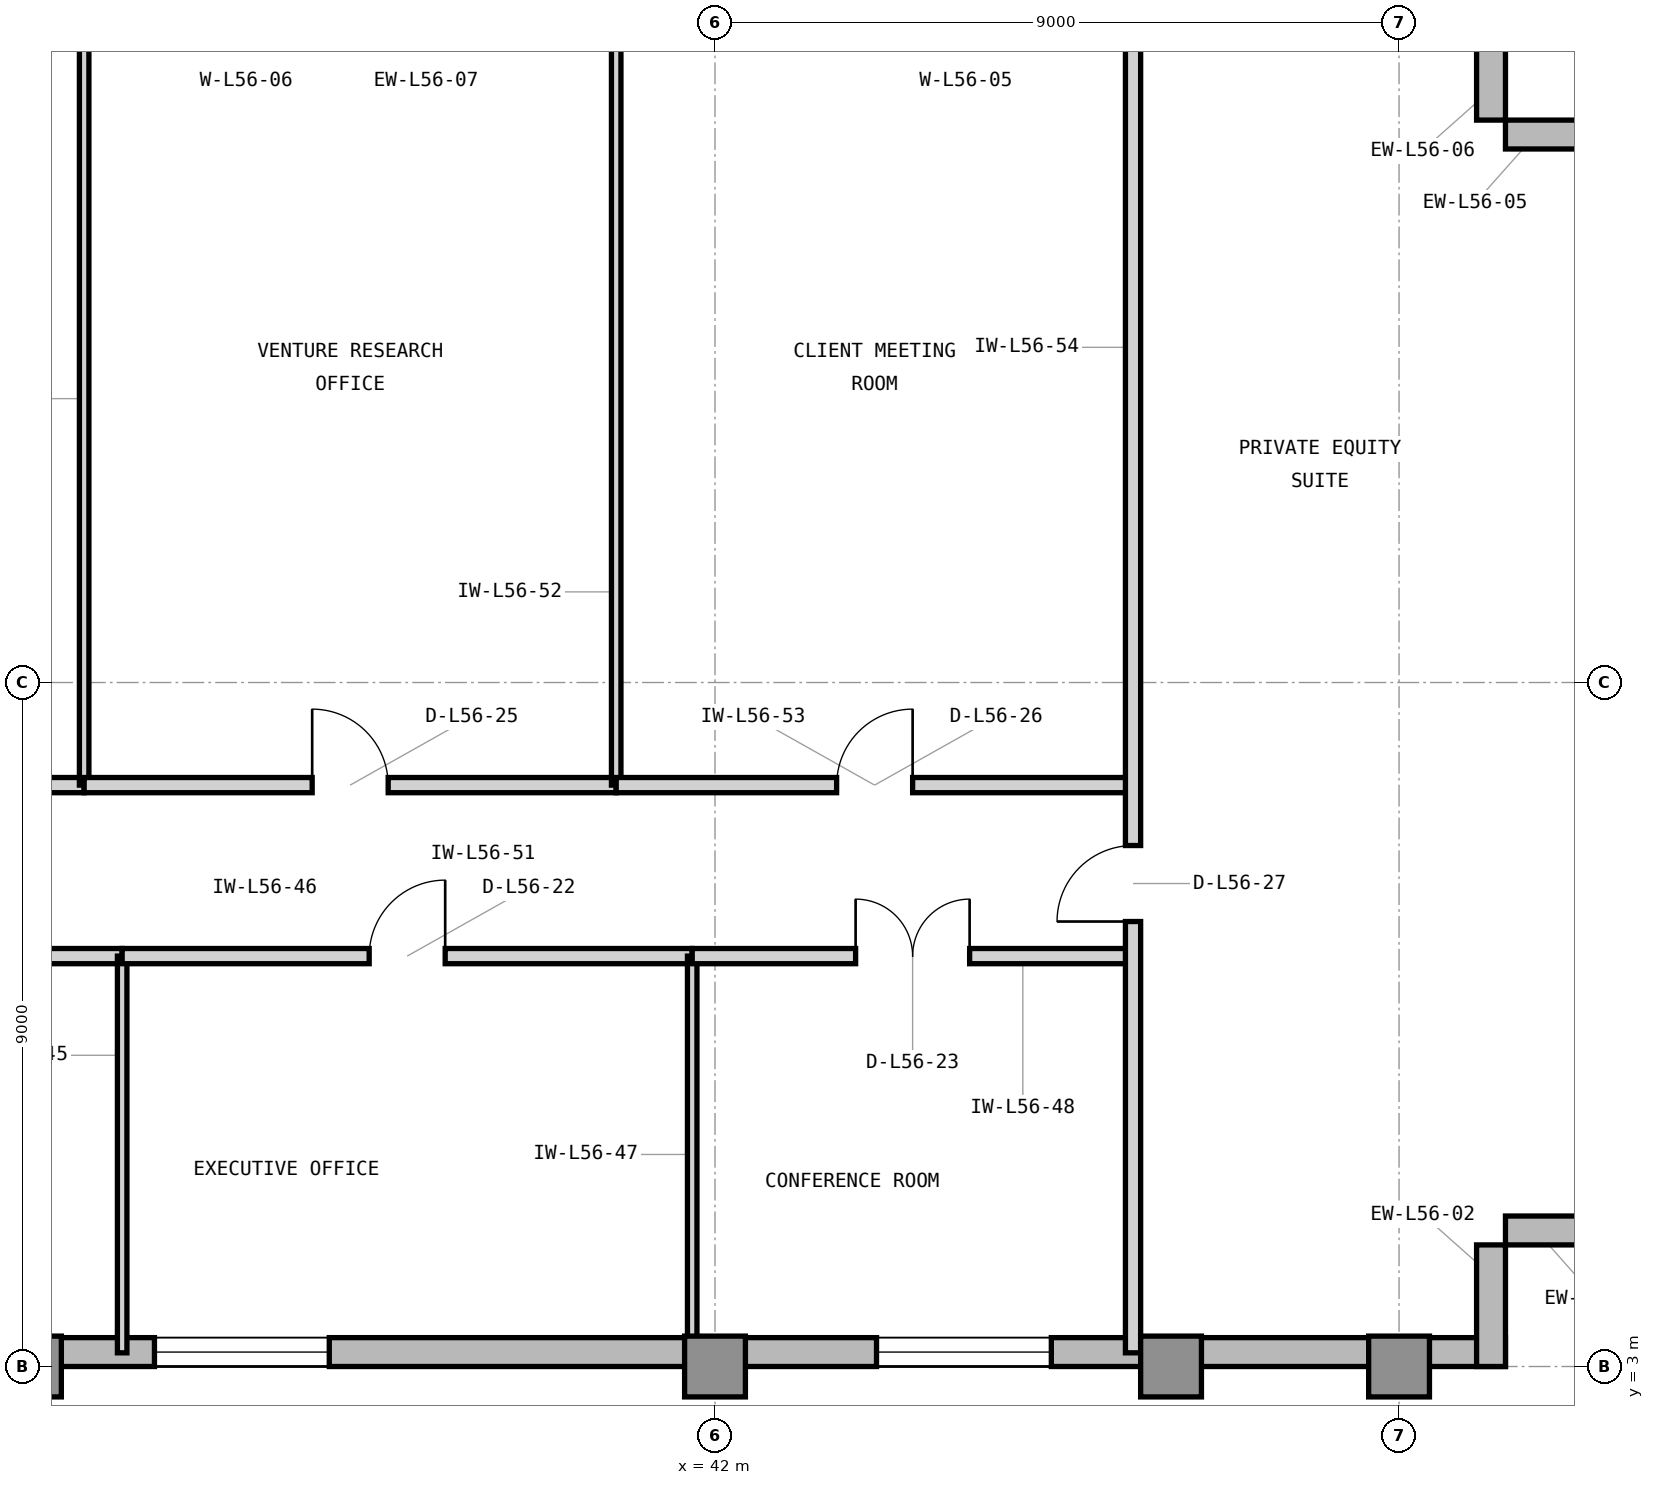
"""IFC4 building model, lengths in metres.
Left out: names, types, materials, properties, quantities, classifications, styles, units other than length and angle.
Written with IfcOpenShell. Run it as: python <this file> out.ifc"""

import sys

from ifc_helpers import new_model, si_unit, direction, frame, frame_2d, origin, origin_2d, place, context, subcontext, project, spatial, rectangle, extrude, element, fill, save


model = new_model("IFC4")
c1 = context("Model", 3, precision=1e-05, world=origin(), true_north=direction((0.0, 1.0)))
c2 = subcontext(c1, "Body", "Model", "MODEL_VIEW")
j1 = project(units=[si_unit("LENGTHUNIT", "METRE"), si_unit("PLANEANGLEUNIT", "RADIAN")], contexts=[c1])
p1 = place(None, origin())
s1 = spatial("IfcSite", under=j1, at=p1, CompositionType="ELEMENT")
p2 = place(p1, origin())
s2 = spatial("IfcBuilding", under=s1, at=p2, CompositionType="ELEMENT")
p3 = place(p2, frame((0.0, 0.0, 231.3)))
s3 = spatial("IfcBuildingStorey", under=s2, at=p3, CompositionType="ELEMENT", Elevation=231.3)
for number, where, z_axis, x_axis in (
    (1, (33.0, 3.0, 0.0), (0.0, 0.0, 1.0), (1.0, 0.0, 0.0)),
    (2, (42.0, 3.0, 0.0), (0.0, 0.0, 1.0), (1.0, 0.0, 0.0)),
    (3, (48.0, 3.0, 0.0), (0.0, 0.0, 1.0), (1.0, 0.0, 0.0)),
    (4, (51.0, 3.0, 0.0), (0.0, 0.0, 1.0), (1.0, 0.0, 0.0)),
):
    element("IfcColumn", number, at=place(p3, frame(where, z_axis=z_axis, x_axis=x_axis)), inside=s3, PredefinedType="COLUMN", context=c2, shape_type="SweptSolid", body=[
        extrude(rectangle(XDim=0.8, YDim=0.8, at=origin_2d()), origin(), (0.0, 0.0, 1.0), 3.9),
    ])
p4 = place(p3, frame((23.9, 3.19, 0.0), z_axis=(0.0, 0.0, 1.0), x_axis=(1.0, 0.0, 0.0)))
e5 = element("IfcWall", 5, at=p4, inside=s3, PredefinedType="STANDARD", context=c2, shape_type="SweptSolid", body=[
    extrude(rectangle(XDim=28.5, YDim=0.38, at=frame_2d((14.25, 0.0))), origin(), (0.0, 0.0, 1.0), 3.7),
])
p5 = place(p4, frame((10.725, 0.0, 0.9)))
e6 = element("IfcOpeningElement", 6, at=p5, cuts=e5, PredefinedType="OPENING", context=c2, shape_type="SweptSolid", body=[
    extrude(rectangle(XDim=2.3, YDim=2.2, at=frame_2d((1.15, 1.1))), frame((0.0, 0.2, 0.0), z_axis=(0.0, -1.0, 0.0), x_axis=(1.0, 0.0, 0.0)), (0.0, 0.0, 1.0), 0.4),
])
p6 = place(p4, frame((20.225, 0.0, 0.9)))
e7 = element("IfcOpeningElement", 7, at=p6, cuts=e5, PredefinedType="OPENING", context=c2, shape_type="SweptSolid", body=[
    extrude(rectangle(XDim=2.3, YDim=2.2, at=frame_2d((1.15, 1.1))), frame((0.0, 0.2, 0.0), z_axis=(0.0, -1.0, 0.0), x_axis=(1.0, 0.0, 0.0)), (0.0, 0.0, 1.0), 0.4),
])
p7 = place(p4, frame((0.85, 0.0, 0.9)))
e8 = element("IfcOpeningElement", 8, at=p7, cuts=e5, PredefinedType="OPENING", context=c2, shape_type="SweptSolid", body=[
    extrude(rectangle(XDim=1.6, YDim=2.2, at=frame_2d((0.8, 1.1))), frame((0.0, 0.2, 0.0), z_axis=(0.0, -1.0, 0.0), x_axis=(1.0, 0.0, 0.0)), (0.0, 0.0, 1.0), 0.4),
])
for number, where, z_axis, x_axis in (
    (9, (52.21, 3.0, 0.0), (0.0, 0.0, 1.0), (0.0, 1.0, 0.0)),
    (10, (52.4, 4.79, 0.0), (0.0, 0.0, 1.0), (1.0, 0.0, 0.0)),
    (11, (54.0, 19.21, 0.0), (0.0, 0.0, 1.0), (-1.0, 0.0, 0.0)),
    (12, (52.21, 19.4, 0.0), (0.0, 0.0, 1.0), (0.0, 1.0, 0.0)),
):
    element("IfcWall", number, at=place(p3, frame(where, z_axis=z_axis, x_axis=x_axis)), inside=s3, PredefinedType="STANDARD", context=c2, shape_type="SweptSolid", body=[
        extrude(rectangle(XDim=1.6, YDim=0.38, at=frame_2d((0.8, 0.0))), origin(), (0.0, 0.0, 1.0), 3.7),
    ])
p8 = place(p3, frame((26.7, 8.4, 0.0), z_axis=(0.0, 0.0, 1.0), x_axis=(1.0, 0.0, 0.0)))
e13 = element("IfcWall", 13, at=p8, inside=s3, PredefinedType="PARTITIONING", context=c2, shape_type="SweptSolid", body=[
    extrude(rectangle(XDim=7.5, YDim=0.2, at=frame_2d((3.75, 0.0))), origin(), (0.0, 0.0, 1.0), 3.69),
])
p9 = place(p8, frame((3.25, 0.0, 0.0)))
e14 = element("IfcOpeningElement", 14, at=p9, cuts=e13, PredefinedType="OPENING", context=c2, shape_type="SweptSolid", body=[
    extrude(rectangle(XDim=1.0, YDim=2.15, at=frame_2d((0.5, 1.075))), frame((0.0, 0.11, 0.0), z_axis=(0.0, -1.0, 0.0), x_axis=(1.0, 0.0, 0.0)), (0.0, 0.0, 1.0), 0.22),
])
p10 = place(p3, frame((34.2, 3.18, 0.0), z_axis=(0.0, 0.0, 1.0), x_axis=(0.0, 1.0, 0.0)))
e15 = element("IfcWall", 15, at=p10, inside=s3, PredefinedType="PARTITIONING", context=c2, shape_type="SweptSolid", body=[
    extrude(rectangle(XDim=5.22, YDim=0.125, at=frame_2d((2.61, 0.0))), origin(), (0.0, 0.0, 1.0), 3.69),
])
p11 = place(p3, frame((34.2, 8.4, 0.0), z_axis=(0.0, 0.0, 1.0), x_axis=(1.0, 0.0, 0.0)))
e16 = element("IfcWall", 16, at=p11, inside=s3, PredefinedType="PARTITIONING", context=c2, shape_type="SweptSolid", body=[
    extrude(rectangle(XDim=7.5, YDim=0.2, at=frame_2d((3.75, 0.0))), origin(), (0.0, 0.0, 1.0), 3.69),
])
p12 = place(p11, frame((3.25, 0.0, 0.0)))
e17 = element("IfcOpeningElement", 17, at=p12, cuts=e16, PredefinedType="OPENING", context=c2, shape_type="SweptSolid", body=[
    extrude(rectangle(XDim=1.0, YDim=2.15, at=frame_2d((0.5, 1.075))), frame((0.0, 0.11, 0.0), z_axis=(0.0, -1.0, 0.0), x_axis=(1.0, 0.0, 0.0)), (0.0, 0.0, 1.0), 0.22),
])
p13 = place(p3, frame((41.7, 3.18, 0.0), z_axis=(0.0, 0.0, 1.0), x_axis=(0.0, 1.0, 0.0)))
e18 = element("IfcWall", 18, at=p13, inside=s3, PredefinedType="PARTITIONING", context=c2, shape_type="SweptSolid", body=[
    extrude(rectangle(XDim=5.22, YDim=0.125, at=frame_2d((2.61, 0.0))), origin(), (0.0, 0.0, 1.0), 3.69),
])
p14 = place(p3, frame((41.7, 8.4, 0.0), z_axis=(0.0, 0.0, 1.0), x_axis=(1.0, 0.0, 0.0)))
e19 = element("IfcWall", 19, at=p14, inside=s3, PredefinedType="PARTITIONING", context=c2, shape_type="SweptSolid", body=[
    extrude(rectangle(XDim=5.8, YDim=0.2, at=frame_2d((2.9, 0.0))), origin(), (0.0, 0.0, 1.0), 3.69),
])
p15 = place(p14, frame((2.15, 0.0, 0.0)))
e20 = element("IfcOpeningElement", 20, at=p15, cuts=e19, PredefinedType="OPENING", context=c2, shape_type="SweptSolid", body=[
    extrude(rectangle(XDim=1.5, YDim=2.3, at=frame_2d((0.75, 1.15))), frame((0.0, 0.11, 0.0), z_axis=(0.0, -1.0, 0.0), x_axis=(1.0, 0.0, 0.0)), (0.0, 0.0, 1.0), 0.22),
])
p16 = place(p3, frame((26.7, 10.65, 0.0), z_axis=(0.0, 0.0, 1.0), x_axis=(1.0, 0.0, 0.0)))
e21 = element("IfcWall", 21, at=p16, inside=s3, PredefinedType="PARTITIONING", context=c2, shape_type="SweptSolid", body=[
    extrude(rectangle(XDim=7.0, YDim=0.2, at=frame_2d((3.5, 0.0))), origin(), (0.0, 0.0, 1.0), 3.69),
])
p17 = place(p16, frame((2.75, 0.0, 0.0)))
e22 = element("IfcOpeningElement", 22, at=p17, cuts=e21, PredefinedType="OPENING", context=c2, shape_type="SweptSolid", body=[
    extrude(rectangle(XDim=1.5, YDim=2.3, at=frame_2d((0.75, 1.15))), frame((0.0, 0.11, 0.0), z_axis=(0.0, -1.0, 0.0), x_axis=(1.0, 0.0, 0.0)), (0.0, 0.0, 1.0), 0.22),
])
p18 = place(p3, frame((33.7, 10.65, 0.0), z_axis=(0.0, 0.0, 1.0), x_axis=(0.0, 1.0, 0.0)))
e23 = element("IfcWall", 23, at=p18, inside=s3, PredefinedType="PARTITIONING", context=c2, shape_type="SweptSolid", body=[
    extrude(rectangle(XDim=10.17, YDim=0.125, at=frame_2d((5.085, 0.0))), origin(), (0.0, 0.0, 1.0), 3.69),
])
p19 = place(p3, frame((33.7, 10.65, 0.0), z_axis=(0.0, 0.0, 1.0), x_axis=(1.0, 0.0, 0.0)))
e24 = element("IfcWall", 24, at=p19, inside=s3, PredefinedType="PARTITIONING", context=c2, shape_type="SweptSolid", body=[
    extrude(rectangle(XDim=7.0, YDim=0.2, at=frame_2d((3.5, 0.0))), origin(), (0.0, 0.0, 1.0), 3.69),
])
p20 = place(p19, frame((3.0, 0.0, 0.0)))
e25 = element("IfcOpeningElement", 25, at=p20, cuts=e24, PredefinedType="OPENING", context=c2, shape_type="SweptSolid", body=[
    extrude(rectangle(XDim=1.0, YDim=2.15, at=frame_2d((0.5, 1.075))), frame((0.0, 0.11, 0.0), z_axis=(0.0, -1.0, 0.0), x_axis=(1.0, 0.0, 0.0)), (0.0, 0.0, 1.0), 0.22),
])
p21 = place(p3, frame((40.7, 10.65, 0.0), z_axis=(0.0, 0.0, 1.0), x_axis=(0.0, 1.0, 0.0)))
e26 = element("IfcWall", 26, at=p21, inside=s3, PredefinedType="PARTITIONING", context=c2, shape_type="SweptSolid", body=[
    extrude(rectangle(XDim=10.17, YDim=0.125, at=frame_2d((5.085, 0.0))), origin(), (0.0, 0.0, 1.0), 3.69),
])
p22 = place(p3, frame((40.7, 10.65, 0.0), z_axis=(0.0, 0.0, 1.0), x_axis=(1.0, 0.0, 0.0)))
e27 = element("IfcWall", 27, at=p22, inside=s3, PredefinedType="PARTITIONING", context=c2, shape_type="SweptSolid", body=[
    extrude(rectangle(XDim=6.8, YDim=0.2, at=frame_2d((3.4, 0.0))), origin(), (0.0, 0.0, 1.0), 3.69),
])
p23 = place(p22, frame((2.9, 0.0, 0.0)))
e28 = element("IfcOpeningElement", 28, at=p23, cuts=e27, PredefinedType="OPENING", context=c2, shape_type="SweptSolid", body=[
    extrude(rectangle(XDim=1.0, YDim=2.15, at=frame_2d((0.5, 1.075))), frame((0.0, 0.11, 0.0), z_axis=(0.0, -1.0, 0.0), x_axis=(1.0, 0.0, 0.0)), (0.0, 0.0, 1.0), 0.22),
])
p24 = place(p3, frame((47.5, 3.18, 0.0), z_axis=(0.0, 0.0, 1.0), x_axis=(0.0, 1.0, 0.0)))
e29 = element("IfcWall", 29, at=p24, inside=s3, PredefinedType="PARTITIONING", context=c2, shape_type="SweptSolid", body=[
    extrude(rectangle(XDim=17.64, YDim=0.2, at=frame_2d((8.82, 0.0))), origin(), (0.0, 0.0, 1.0), 3.69),
])
p25 = place(p24, frame((5.675, 0.0, 0.0)))
e30 = element("IfcOpeningElement", 30, at=p25, cuts=e29, PredefinedType="OPENING", context=c2, shape_type="SweptSolid", body=[
    extrude(rectangle(XDim=1.0, YDim=2.15, at=frame_2d((0.5, 1.075))), frame((0.0, 0.11, 0.0), z_axis=(0.0, -1.0, 0.0), x_axis=(1.0, 0.0, 0.0)), (0.0, 0.0, 1.0), 0.22),
])
p26 = place(p5, origin())
e31 = element("IfcWindow", 31, at=p26, inside=s3, PartitioningType="SINGLE_PANEL", PredefinedType="WINDOW", context=c2, shape_type="SweptSolid", body=[
    extrude(rectangle(XDim=2.3, YDim=2.2, at=frame_2d((1.15, 1.1))), frame((0.0, 0.11, 0.0), z_axis=(0.0, -1.0, 0.0), x_axis=(1.0, 0.0, 0.0)), (0.0, 0.0, 1.0), 0.06),
])
fill(e6, e31)
p27 = place(p6, origin())
e32 = element("IfcWindow", 32, at=p27, inside=s3, PartitioningType="SINGLE_PANEL", PredefinedType="WINDOW", context=c2, shape_type="SweptSolid", body=[
    extrude(rectangle(XDim=2.3, YDim=2.2, at=frame_2d((1.15, 1.1))), frame((0.0, 0.11, 0.0), z_axis=(0.0, -1.0, 0.0), x_axis=(1.0, 0.0, 0.0)), (0.0, 0.0, 1.0), 0.06),
])
fill(e7, e32)
p28 = place(p12, origin())
e33 = element("IfcDoor", 33, at=p28, inside=s3, OperationType="SINGLE_SWING_RIGHT", PredefinedType="DOOR", context=c2, shape_type="SweptSolid", body=[
    extrude(rectangle(XDim=1.0, YDim=2.15, at=frame_2d((0.5, 1.075))), frame((0.0, 0.025, 0.0), z_axis=(0.0, -1.0, 0.0), x_axis=(1.0, 0.0, 0.0)), (0.0, 0.0, 1.0), 0.05),
])
fill(e17, e33)
p29 = place(p15, origin())
e34 = element("IfcDoor", 34, at=p29, inside=s3, OperationType="DOUBLE_DOOR_SINGLE_SWING", PredefinedType="DOOR", context=c2, shape_type="SweptSolid", body=[
    extrude(rectangle(XDim=1.5, YDim=2.3, at=frame_2d((0.75, 1.15))), frame((0.0, 0.025, 0.0), z_axis=(0.0, -1.0, 0.0), x_axis=(1.0, 0.0, 0.0)), (0.0, 0.0, 1.0), 0.05),
])
fill(e20, e34)
p30 = place(p20, origin())
e35 = element("IfcDoor", 35, at=p30, inside=s3, OperationType="SINGLE_SWING_LEFT", PredefinedType="DOOR", context=c2, shape_type="SweptSolid", body=[
    extrude(rectangle(XDim=1.0, YDim=2.15, at=frame_2d((0.5, 1.075))), frame((0.0, 0.025, 0.0), z_axis=(0.0, -1.0, 0.0), x_axis=(1.0, 0.0, 0.0)), (0.0, 0.0, 1.0), 0.05),
])
fill(e25, e35)
p31 = place(p23, origin())
e36 = element("IfcDoor", 36, at=p31, inside=s3, OperationType="SINGLE_SWING_RIGHT", PredefinedType="DOOR", context=c2, shape_type="SweptSolid", body=[
    extrude(rectangle(XDim=1.0, YDim=2.15, at=frame_2d((0.5, 1.075))), frame((0.0, 0.025, 0.0), z_axis=(0.0, -1.0, 0.0), x_axis=(1.0, 0.0, 0.0)), (0.0, 0.0, 1.0), 0.05),
])
fill(e28, e36)
p32 = place(p25, origin())
e37 = element("IfcDoor", 37, at=p32, inside=s3, OperationType="SINGLE_SWING_LEFT", PredefinedType="DOOR", context=c2, shape_type="SweptSolid", body=[
    extrude(rectangle(XDim=1.0, YDim=2.15, at=frame_2d((0.5, 1.075))), frame((0.0, 0.025, 0.0), z_axis=(0.0, -1.0, 0.0), x_axis=(1.0, 0.0, 0.0)), (0.0, 0.0, 1.0), 0.05),
])
fill(e30, e37)
save(model, sys.argv[1])
